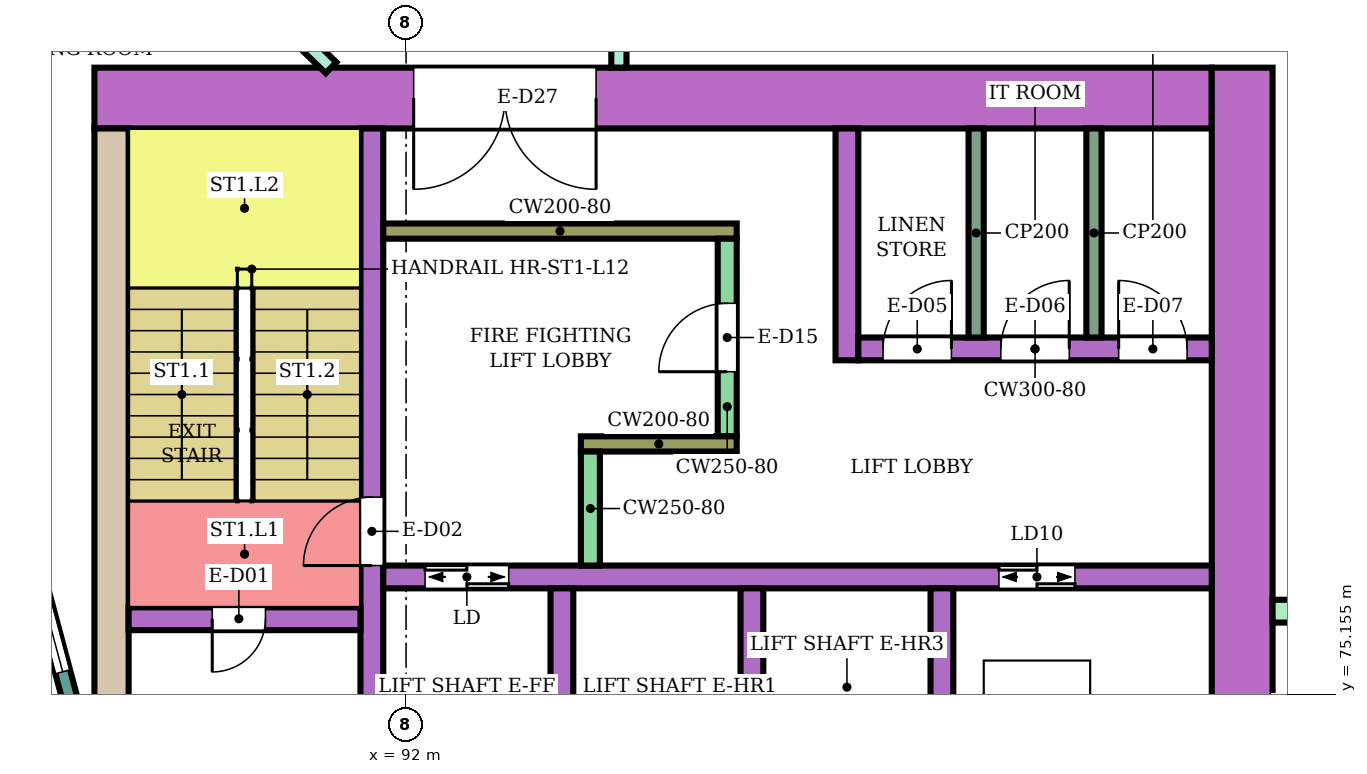
"""IFC4 building model, lengths in metres.
Left out: names, types, materials, properties, quantities, classifications, styles, units other than length and angle.
Written with IfcOpenShell. Run it as: python <this file> out.ifc"""

import sys

from ifc_helpers import new_model, si_unit, direction, frame, frame_2d, origin, place, context, subcontext, project, spatial, rectangle, extrude, element, fill, save


model = new_model("IFC4")
c1 = context("Model", 3, precision=1e-05, world=origin(), true_north=direction((0.0, 1.0)))
c2 = subcontext(c1, "Body", "Model", "MODEL_VIEW")
j1 = project(units=[si_unit("LENGTHUNIT", "METRE"), si_unit("PLANEANGLEUNIT", "RADIAN")], contexts=[c1])
p1 = place(None, origin())
s1 = spatial("IfcSite", under=j1, at=p1, CompositionType="ELEMENT")
p2 = place(p1, origin())
s2 = spatial("IfcBuilding", under=s1, at=p2, CompositionType="ELEMENT")
p3 = place(p2, frame((0.0, 0.0, 55.4)))
s3 = spatial("IfcBuildingStorey", under=s2, at=p3, CompositionType="ELEMENT", Elevation=55.4)
p4 = place(p3, frame((87.9, 83.0, 0.0), z_axis=(0.0, 0.0, 1.0), x_axis=(1.0, 0.0, 0.0)))
e1 = element("IfcWall", 1, at=p4, inside=s3, PredefinedType="SHEAR", context=c2, shape_type="SweptSolid", body=[
    extrude(rectangle(XDim=14.7, YDim=0.8, at=frame_2d((7.35, 0.0))), origin(), (0.0, 0.0, 1.0), 3.48),
])
p5 = place(p4, frame((4.2, 0.0, 0.0)))
e2 = element("IfcOpeningElement", 2, at=p5, cuts=e1, PredefinedType="OPENING", context=c2, shape_type="SweptSolid", body=[
    extrude(rectangle(XDim=2.4, YDim=2.4, at=frame_2d((1.2, 1.2))), frame((0.0, 0.41, 0.0), z_axis=(0.0, -1.0, 0.0), x_axis=(1.0, 0.0, 0.0)), (0.0, 0.0, 1.0), 0.82),
])
p6 = place(p3, frame((88.125, 75.0, 0.0), z_axis=(0.0, 0.0, 1.0), x_axis=(0.0, 1.0, 0.0)))
e3 = element("IfcWall", 3, at=p6, inside=s3, PredefinedType="SHEAR", context=c2, shape_type="SweptSolid", body=[
    extrude(rectangle(XDim=7.6, YDim=0.45, at=frame_2d((3.8, 0.0))), origin(), (0.0, 0.0, 1.0), 3.48),
])
p7 = place(p3, frame((103.0, 66.6, 0.0), z_axis=(0.0, 0.0, 1.0), x_axis=(0.0, 1.0, 0.0)))
e4 = element("IfcWall", 4, at=p7, inside=s3, PredefinedType="SHEAR", context=c2, shape_type="SweptSolid", body=[
    extrude(rectangle(XDim=16.8, YDim=0.8, at=frame_2d((8.4, 0.0))), origin(), (0.0, 0.0, 1.0), 3.48),
])
p8 = place(p3, frame((91.55, 75.0, 0.0), z_axis=(0.0, 0.0, 1.0), x_axis=(0.0, 1.0, 0.0)))
e5 = element("IfcWall", 5, at=p8, inside=s3, PredefinedType="SHEAR", context=c2, shape_type="SweptSolid", body=[
    extrude(rectangle(XDim=7.6, YDim=0.3, at=frame_2d((3.8, 0.0))), origin(), (0.0, 0.0, 1.0), 3.48),
])
p9 = place(p8, frame((1.85, 0.0, 0.0)))
e6 = element("IfcOpeningElement", 6, at=p9, cuts=e5, PredefinedType="OPENING", context=c2, shape_type="SweptSolid", body=[
    extrude(rectangle(XDim=0.9, YDim=2.1, at=frame_2d((0.45, 1.05))), frame((0.0, 0.16, 0.0), z_axis=(0.0, -1.0, 0.0), x_axis=(1.0, 0.0, 0.0)), (0.0, 0.0, 1.0), 0.32),
])
p10 = place(p3, frame((88.35, 76.15, 0.0), z_axis=(0.0, 0.0, 1.0), x_axis=(1.0, 0.0, 0.0)))
e7 = element("IfcWall", 7, at=p10, inside=s3, PredefinedType="SHEAR", context=c2, shape_type="SweptSolid", body=[
    extrude(rectangle(XDim=3.05, YDim=0.3, at=frame_2d((1.525, 0.0))), origin(), (0.0, 0.0, 1.0), 3.48),
])
p11 = place(p10, frame((1.1, 0.0, 0.0)))
e8 = element("IfcOpeningElement", 8, at=p11, cuts=e7, PredefinedType="OPENING", context=c2, shape_type="SweptSolid", body=[
    extrude(rectangle(XDim=0.7, YDim=2.0, at=frame_2d((0.35, 1.0))), frame((0.0, 0.16, 0.0), z_axis=(0.0, -1.0, 0.0), x_axis=(1.0, 0.0, 0.0)), (0.0, 0.0, 1.0), 0.32),
])
p12 = place(p3, frame((91.7, 76.7, 0.0), z_axis=(0.0, 0.0, 1.0), x_axis=(1.0, 0.0, 0.0)))
e9 = element("IfcWall", 9, at=p12, inside=s3, PredefinedType="SHEAR", context=c2, shape_type="SweptSolid", body=[
    extrude(rectangle(XDim=10.9, YDim=0.3, at=frame_2d((5.45, 0.0))), origin(), (0.0, 0.0, 1.0), 3.48),
])
p13 = place(p12, frame((0.55, 0.0, 0.0)))
e10 = element("IfcOpeningElement", 10, at=p13, cuts=e9, PredefinedType="OPENING", context=c2, shape_type="SweptSolid", body=[
    extrude(rectangle(XDim=1.1, YDim=2.1, at=frame_2d((0.55, 1.05))), frame((0.0, 0.16, 0.0), z_axis=(0.0, -1.0, 0.0), x_axis=(1.0, 0.0, 0.0)), (0.0, 0.0, 1.0), 0.32),
])
p14 = place(p12, frame((8.1, 0.0, 0.0)))
e11 = element("IfcOpeningElement", 11, at=p14, cuts=e9, PredefinedType="OPENING", context=c2, shape_type="SweptSolid", body=[
    extrude(rectangle(XDim=1.0, YDim=2.1, at=frame_2d((0.5, 1.05))), frame((0.0, 0.16, 0.0), z_axis=(0.0, -1.0, 0.0), x_axis=(1.0, 0.0, 0.0)), (0.0, 0.0, 1.0), 0.32),
])
for number, where, z_axis, x_axis in (
    (12, (94.05, 74.0, 0.0), (0.0, 0.0, 1.0), (0.0, 1.0, 0.0)),
    (13, (96.55, 74.0, 0.0), (0.0, 0.0, 1.0), (0.0, 1.0, 0.0)),
    (14, (99.05, 74.0, 0.0), (0.0, 0.0, 1.0), (0.0, 1.0, 0.0)),
):
    element("IfcWall", number, at=place(p3, frame(where, z_axis=z_axis, x_axis=x_axis)), inside=s3, PredefinedType="SHEAR", context=c2, shape_type="SweptSolid", body=[
        extrude(rectangle(XDim=2.55, YDim=0.3, at=frame_2d((1.275, 0.0))), origin(), (0.0, 0.0, 1.0), 3.48),
    ])
p15 = place(p3, frame((91.7, 81.25, 0.0), z_axis=(0.0, 0.0, 1.0), x_axis=(1.0, 0.0, 0.0)))
e15 = element("IfcWall", 15, at=p15, inside=s3, PredefinedType="SHEAR", context=c2, shape_type="SweptSolid", body=[
    extrude(rectangle(XDim=4.65, YDim=0.2, at=frame_2d((2.325, 0.0))), origin(), (0.0, 0.0, 1.0), 3.48),
])
p16 = place(p3, frame((96.225, 78.55, 0.0), z_axis=(0.0, 0.0, 1.0), x_axis=(0.0, 1.0, 0.0)))
e16 = element("IfcWall", 16, at=p16, inside=s3, PredefinedType="SHEAR", context=c2, shape_type="SweptSolid", body=[
    extrude(rectangle(XDim=2.6, YDim=0.25, at=frame_2d((1.3, 0.0))), origin(), (0.0, 0.0, 1.0), 3.48),
])
p17 = place(p16, frame((0.85, 0.0, 0.0)))
e17 = element("IfcOpeningElement", 17, at=p17, cuts=e16, PredefinedType="OPENING", context=c2, shape_type="SweptSolid", body=[
    extrude(rectangle(XDim=0.9, YDim=2.1, at=frame_2d((0.45, 1.05))), frame((0.0, 0.135, 0.0), z_axis=(0.0, -1.0, 0.0), x_axis=(1.0, 0.0, 0.0)), (0.0, 0.0, 1.0), 0.27),
])
p18 = place(p3, frame((94.3, 78.45, 0.0), z_axis=(0.0, 0.0, 1.0), x_axis=(1.0, 0.0, 0.0)))
e18 = element("IfcWall", 18, at=p18, inside=s3, PredefinedType="SHEAR", context=c2, shape_type="SweptSolid", body=[
    extrude(rectangle(XDim=2.05, YDim=0.2, at=frame_2d((1.025, 0.0))), origin(), (0.0, 0.0, 1.0), 3.48),
])
p19 = place(p3, frame((94.425, 76.85, 0.0), z_axis=(0.0, 0.0, 1.0), x_axis=(0.0, 1.0, 0.0)))
e19 = element("IfcWall", 19, at=p19, inside=s3, PredefinedType="SHEAR", context=c2, shape_type="SweptSolid", body=[
    extrude(rectangle(XDim=1.5, YDim=0.25, at=frame_2d((0.75, 0.0))), origin(), (0.0, 0.0, 1.0), 3.48),
])
p20 = place(p3, frame((97.8, 79.55, 0.0), z_axis=(0.0, 0.0, 1.0), x_axis=(0.0, 1.0, 0.0)))
e20 = element("IfcWall", 20, at=p20, inside=s3, PredefinedType="SHEAR", context=c2, shape_type="SweptSolid", body=[
    extrude(rectangle(XDim=3.05, YDim=0.3, at=frame_2d((1.525, 0.0))), origin(), (0.0, 0.0, 1.0), 3.48),
])
p21 = place(p3, frame((97.95, 79.7, 0.0), z_axis=(0.0, 0.0, 1.0), x_axis=(1.0, 0.0, 0.0)))
e21 = element("IfcWall", 21, at=p21, inside=s3, PredefinedType="SHEAR", context=c2, shape_type="SweptSolid", body=[
    extrude(rectangle(XDim=4.65, YDim=0.3, at=frame_2d((2.325, 0.0))), origin(), (0.0, 0.0, 1.0), 3.48),
])
p22 = place(p21, frame((0.325, 0.0, 0.0)))
e22 = element("IfcOpeningElement", 22, at=p22, cuts=e21, PredefinedType="OPENING", context=c2, shape_type="SweptSolid", body=[
    extrude(rectangle(XDim=0.9, YDim=2.1, at=frame_2d((0.45, 1.05))), frame((0.0, 0.16, 0.0), z_axis=(0.0, -1.0, 0.0), x_axis=(1.0, 0.0, 0.0)), (0.0, 0.0, 1.0), 0.32),
])
p23 = place(p21, frame((1.875, 0.0, 0.0)))
e23 = element("IfcOpeningElement", 23, at=p23, cuts=e21, PredefinedType="OPENING", context=c2, shape_type="SweptSolid", body=[
    extrude(rectangle(XDim=0.9, YDim=2.1, at=frame_2d((0.45, 1.05))), frame((0.0, 0.16, 0.0), z_axis=(0.0, -1.0, 0.0), x_axis=(1.0, 0.0, 0.0)), (0.0, 0.0, 1.0), 0.32),
])
p24 = place(p21, frame((3.425, 0.0, 0.0)))
e24 = element("IfcOpeningElement", 24, at=p24, cuts=e21, PredefinedType="OPENING", context=c2, shape_type="SweptSolid", body=[
    extrude(rectangle(XDim=0.9, YDim=2.1, at=frame_2d((0.45, 1.05))), frame((0.0, 0.16, 0.0), z_axis=(0.0, -1.0, 0.0), x_axis=(1.0, 0.0, 0.0)), (0.0, 0.0, 1.0), 0.32),
])
p25 = place(p3, frame((103.4, 76.25, 0.0), z_axis=(0.0, 0.0, 1.0), x_axis=(1.0, 0.0, 0.0)))
e25 = element("IfcWall", 25, at=p25, inside=s3, PredefinedType="NOTDEFINED", context=c2, shape_type="SweptSolid", body=[
    extrude(rectangle(XDim=2.416, YDim=0.3, at=frame_2d((1.208, 0.0))), origin(), (0.0, 0.0, 1.0), 3.8),
])
p26 = place(p3, frame((87.604, 75.0, 0.0), z_axis=(0.0, 0.0, 1.0), x_axis=(-0.258789828301, 0.965933654434, 0.0)))
e26 = element("IfcWall", 26, at=p26, inside=s3, PredefinedType="NOTDEFINED", context=c2, shape_type="SweptSolid", body=[
    extrude(rectangle(XDim=3.936, YDim=0.2, at=frame_2d((1.968, 0.0))), origin(), (0.0, 0.0, 1.0), 3.8),
])
p27 = place(p26, frame((0.468, 0.0, 0.9)))
e27 = element("IfcOpeningElement", 27, at=p27, cuts=e26, PredefinedType="OPENING", context=c2, shape_type="SweptSolid", body=[
    extrude(rectangle(XDim=3.0, YDim=2.3, at=frame_2d((1.5, 1.15))), frame((0.0, 0.11, 0.0), z_axis=(0.0, -1.0, 0.0), x_axis=(1.0, 0.0, 0.0)), (0.0, 0.0, 1.0), 0.22),
])
p28 = place(p3, frame((87.064, 87.211, 0.0), z_axis=(0.0, 0.0, 1.0), x_axis=(0.719562412484, -0.694427774891, 0.0)))
e28 = element("IfcWall", 28, at=p28, inside=s3, PredefinedType="PARTITIONING", context=c2, shape_type="SweptSolid", body=[
    extrude(rectangle(XDim=5.488, YDim=0.2, at=frame_2d((2.744, 0.0))), origin(), (0.0, 0.0, 1.0), 3.35),
])
p29 = place(p28, frame((2.294, 0.0, 0.0)))
e29 = element("IfcOpeningElement", 29, at=p29, cuts=e28, PredefinedType="OPENING", context=c2, shape_type="SweptSolid", body=[
    extrude(rectangle(XDim=0.9, YDim=2.1, at=frame_2d((0.45, 1.05))), frame((0.0, 0.11, 0.0), z_axis=(0.0, -1.0, 0.0), x_axis=(1.0, 0.0, 0.0)), (0.0, 0.0, 1.0), 0.22),
])
p30 = place(p3, frame((94.8, 83.401, 0.0), z_axis=(0.0, 0.0, 1.0), x_axis=(0.0, 1.0, 0.0)))
e30 = element("IfcWall", 30, at=p30, inside=s3, PredefinedType="PARTITIONING", context=c2, shape_type="SweptSolid", body=[
    extrude(rectangle(XDim=1.499, YDim=0.2, at=frame_2d((0.75, 0.0))), origin(), (0.0, 0.0, 1.0), 3.35),
])
for number, where, z_axis, x_axis in (
    (31, (99.5, 79.85, 0.0), (0.0, 0.0, 1.0), (0.0, 1.0, 0.0)),
    (32, (101.05, 79.85, 0.0), (0.0, 0.0, 1.0), (0.0, 1.0, 0.0)),
):
    element("IfcWall", number, at=place(p3, frame(where, z_axis=z_axis, x_axis=x_axis)), inside=s3, PredefinedType="PARTITIONING", context=c2, shape_type="SweptSolid", body=[
        extrude(rectangle(XDim=2.75, YDim=0.2, at=frame_2d((1.375, 0.0))), origin(), (0.0, 0.0, 1.0), 3.48),
    ])
p31 = place(p27, origin())
e33 = element("IfcWindow", 33, at=p31, inside=s3, PartitioningType="SINGLE_PANEL", PredefinedType="WINDOW", context=c2, shape_type="SweptSolid", body=[
    extrude(rectangle(XDim=3.0, YDim=2.3, at=frame_2d((1.5, 1.15))), frame((0.0, 0.03, 0.0), z_axis=(0.0, -1.0, 0.0), x_axis=(1.0, 0.0, 0.0)), (0.0, 0.0, 1.0), 0.06),
])
fill(e27, e33)
p32 = place(p11, frame((0.7, 0.0, 0.0), z_axis=(0.0, 0.0, 1.0), x_axis=(-1.0, 0.0, 0.0)))
e34 = element("IfcDoor", 34, at=p32, inside=s3, OperationType="SINGLE_SWING_RIGHT", PredefinedType="DOOR", context=c2, shape_type="SweptSolid", body=[
    extrude(rectangle(XDim=0.7, YDim=2.0, at=frame_2d((0.35, 1.0))), frame((0.0, 0.025, 0.0), z_axis=(0.0, -1.0, 0.0), x_axis=(1.0, 0.0, 0.0)), (0.0, 0.0, 1.0), 0.05),
])
fill(e8, e34)
p33 = place(p9, origin())
e35 = element("IfcDoor", 35, at=p33, inside=s3, OperationType="SINGLE_SWING_LEFT", PredefinedType="DOOR", context=c2, shape_type="SweptSolid", body=[
    extrude(rectangle(XDim=0.9, YDim=2.1, at=frame_2d((0.45, 1.05))), frame((0.0, 0.025, 0.0), z_axis=(0.0, -1.0, 0.0), x_axis=(1.0, 0.0, 0.0)), (0.0, 0.0, 1.0), 0.05),
])
fill(e6, e35)
p34 = place(p13, origin())
e36 = element("IfcDoor", 36, at=p34, inside=s3, OperationType="DOUBLE_DOOR_SLIDING", PredefinedType="DOOR", context=c2, shape_type="SweptSolid", body=[
    extrude(rectangle(XDim=1.1, YDim=2.1, at=frame_2d((0.55, 1.05))), frame((0.0, 0.025, 0.0), z_axis=(0.0, -1.0, 0.0), x_axis=(1.0, 0.0, 0.0)), (0.0, 0.0, 1.0), 0.05),
])
fill(e10, e36)
p35 = place(p14, origin())
e37 = element("IfcDoor", 37, at=p35, inside=s3, OperationType="DOUBLE_DOOR_SLIDING", PredefinedType="DOOR", context=c2, shape_type="SweptSolid", body=[
    extrude(rectangle(XDim=1.0, YDim=2.1, at=frame_2d((0.5, 1.05))), frame((0.0, 0.025, 0.0), z_axis=(0.0, -1.0, 0.0), x_axis=(1.0, 0.0, 0.0)), (0.0, 0.0, 1.0), 0.05),
])
fill(e11, e37)
p36 = place(p17, origin())
e38 = element("IfcDoor", 38, at=p36, inside=s3, OperationType="SINGLE_SWING_LEFT", PredefinedType="DOOR", context=c2, shape_type="SweptSolid", body=[
    extrude(rectangle(XDim=0.9, YDim=2.1, at=frame_2d((0.45, 1.05))), frame((0.0, 0.025, 0.0), z_axis=(0.0, -1.0, 0.0), x_axis=(1.0, 0.0, 0.0)), (0.0, 0.0, 1.0), 0.05),
])
fill(e17, e38)
p37 = place(p22, origin())
e39 = element("IfcDoor", 39, at=p37, inside=s3, OperationType="SINGLE_SWING_RIGHT", PredefinedType="DOOR", context=c2, shape_type="SweptSolid", body=[
    extrude(rectangle(XDim=0.9, YDim=2.1, at=frame_2d((0.45, 1.05))), frame((0.0, 0.025, 0.0), z_axis=(0.0, -1.0, 0.0), x_axis=(1.0, 0.0, 0.0)), (0.0, 0.0, 1.0), 0.05),
])
fill(e22, e39)
p38 = place(p23, origin())
e40 = element("IfcDoor", 40, at=p38, inside=s3, OperationType="SINGLE_SWING_RIGHT", PredefinedType="DOOR", context=c2, shape_type="SweptSolid", body=[
    extrude(rectangle(XDim=0.9, YDim=2.1, at=frame_2d((0.45, 1.05))), frame((0.0, 0.025, 0.0), z_axis=(0.0, -1.0, 0.0), x_axis=(1.0, 0.0, 0.0)), (0.0, 0.0, 1.0), 0.05),
])
fill(e23, e40)
p39 = place(p24, origin())
e41 = element("IfcDoor", 41, at=p39, inside=s3, OperationType="SINGLE_SWING_LEFT", PredefinedType="DOOR", context=c2, shape_type="SweptSolid", body=[
    extrude(rectangle(XDim=0.9, YDim=2.1, at=frame_2d((0.45, 1.05))), frame((0.0, 0.025, 0.0), z_axis=(0.0, -1.0, 0.0), x_axis=(1.0, 0.0, 0.0)), (0.0, 0.0, 1.0), 0.05),
])
fill(e24, e41)
p40 = place(p5, frame((2.4, 0.0, 0.0), z_axis=(0.0, 0.0, 1.0), x_axis=(-1.0, 0.0, 0.0)))
e42 = element("IfcDoor", 42, at=p40, inside=s3, OperationType="DOUBLE_DOOR_SINGLE_SWING", PredefinedType="DOOR", context=c2, shape_type="SweptSolid", body=[
    extrude(rectangle(XDim=2.4, YDim=2.4, at=frame_2d((1.2, 1.2))), frame((0.0, 0.025, 0.0), z_axis=(0.0, -1.0, 0.0), x_axis=(1.0, 0.0, 0.0)), (0.0, 0.0, 1.0), 0.05),
])
fill(e2, e42)
save(model, sys.argv[1])
